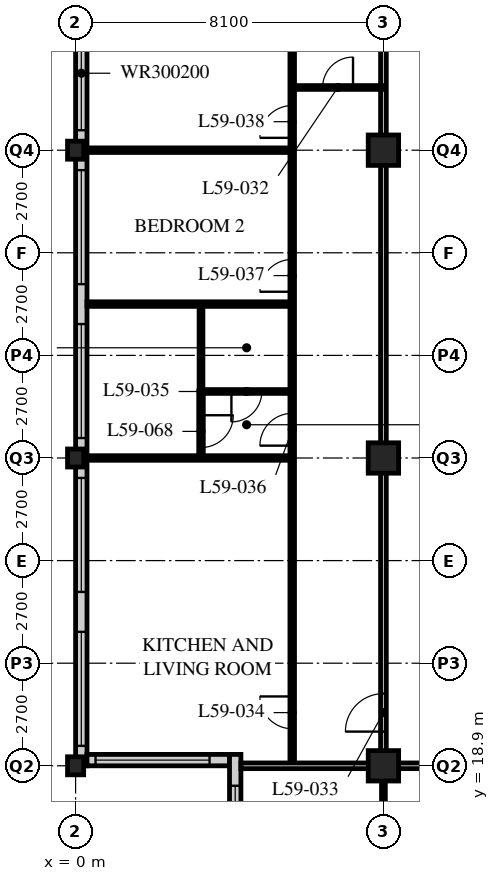
"""IFC4 building model, lengths in metres.
Left out: names, types, materials, properties, quantities, classifications, styles, units other than length and angle.
Written with IfcOpenShell. Run it as: python <this file> out.ifc"""

import sys

from ifc_helpers import new_model, si_unit, direction, frame, frame_2d, origin, origin_2d, place, context, subcontext, project, spatial, rectangle, hollow_rectangle, i_section, extrude, element, fill, save


model = new_model("IFC4")
c1 = context("Model", 3, precision=1e-05, world=origin(), true_north=direction((0.0, 1.0)))
c2 = subcontext(c1, "Body", "Model", "MODEL_VIEW")
j1 = project(units=[si_unit("LENGTHUNIT", "METRE"), si_unit("PLANEANGLEUNIT", "RADIAN")], contexts=[c1])
p1 = place(None, origin())
s1 = spatial("IfcSite", under=j1, at=p1, CompositionType="ELEMENT")
p2 = place(p1, origin())
s2 = spatial("IfcBuilding", under=s1, at=p2, CompositionType="ELEMENT")
p3 = place(p2, frame((0.0, 0.0, 228.0)))
s3 = spatial("IfcBuildingStorey", under=s2, at=p3, CompositionType="ELEMENT", Elevation=228.0)
for number, where, z_axis, x_axis in (
    (1, (0.0, 18.9, 0.0), (0.0, 0.0, 1.0), (1.0, 0.0, 0.0)),
    (2, (0.0, 27.0, 0.0), (0.0, 0.0, 1.0), (1.0, 0.0, 0.0)),
    (3, (0.0, 35.1, 0.0), (0.0, 0.0, 1.0), (1.0, 0.0, 0.0)),
):
    element("IfcColumn", number, at=place(p3, frame(where, z_axis=z_axis, x_axis=x_axis)), inside=s3, PredefinedType="COLUMN", context=c2, shape_type="SweptSolid", body=[
        extrude(i_section(OverallWidth=0.424, OverallDepth=0.475, WebThickness=0.048, FlangeThickness=0.077, FilletRadius=0.015, at=origin_2d()), origin(), (0.0, 0.0, 1.0), 3.6),
    ])
for number, where, z_axis, x_axis in (
    (4, (8.1, 18.9, 0.0), (0.0, 0.0, 1.0), (1.0, 0.0, 0.0)),
    (5, (8.1, 27.0, 0.0), (0.0, 0.0, 1.0), (1.0, 0.0, 0.0)),
    (6, (8.1, 35.1, 0.0), (0.0, 0.0, 1.0), (1.0, 0.0, 0.0)),
):
    element("IfcColumn", number, at=place(p3, frame(where, z_axis=z_axis, x_axis=x_axis)), inside=s3, PredefinedType="COLUMN", context=c2, shape_type="SweptSolid", body=[
        extrude(hollow_rectangle(XDim=0.8, YDim=0.8, WallThickness=0.08, at=origin_2d()), origin(), (0.0, 0.0, 1.0), 3.6),
    ])
p4 = place(p3, frame((0.15, 51.0, 0.0), z_axis=(0.0, 0.0, 1.0), x_axis=(0.0, -1.0, 0.0)))
e7 = element("IfcWall", 7, at=p4, inside=s3, PredefinedType="SOLIDWALL", context=c2, shape_type="SweptSolid", body=[
    extrude(rectangle(XDim=32.1, YDim=0.3, at=frame_2d((16.05, 0.0))), origin(), (0.0, 0.0, 1.0), 3.39),
])
p5 = place(p4, frame((0.225, 0.0, 0.6)))
e8 = element("IfcOpeningElement", 8, at=p5, cuts=e7, PredefinedType="OPENING", context=c2, shape_type="SweptSolid", body=[
    extrude(rectangle(XDim=3.0, YDim=2.0, at=frame_2d((1.5, 1.0))), frame((0.0, 0.16, 0.0), z_axis=(0.0, -1.0, 0.0), x_axis=(1.0, 0.0, 0.0)), (0.0, 0.0, 1.0), 0.32),
])
p6 = place(p4, frame((4.275, 0.0, 0.6)))
e9 = element("IfcOpeningElement", 9, at=p6, cuts=e7, PredefinedType="OPENING", context=c2, shape_type="SweptSolid", body=[
    extrude(rectangle(XDim=3.0, YDim=2.0, at=frame_2d((1.5, 1.0))), frame((0.0, 0.16, 0.0), z_axis=(0.0, -1.0, 0.0), x_axis=(1.0, 0.0, 0.0)), (0.0, 0.0, 1.0), 0.32),
])
p7 = place(p4, frame((8.325, 0.0, 0.6)))
e10 = element("IfcOpeningElement", 10, at=p7, cuts=e7, PredefinedType="OPENING", context=c2, shape_type="SweptSolid", body=[
    extrude(rectangle(XDim=3.0, YDim=2.0, at=frame_2d((1.5, 1.0))), frame((0.0, 0.16, 0.0), z_axis=(0.0, -1.0, 0.0), x_axis=(1.0, 0.0, 0.0)), (0.0, 0.0, 1.0), 0.32),
])
p8 = place(p4, frame((12.375, 0.0, 0.6)))
e11 = element("IfcOpeningElement", 11, at=p8, cuts=e7, PredefinedType="OPENING", context=c2, shape_type="SweptSolid", body=[
    extrude(rectangle(XDim=3.0, YDim=2.0, at=frame_2d((1.5, 1.0))), frame((0.0, 0.16, 0.0), z_axis=(0.0, -1.0, 0.0), x_axis=(1.0, 0.0, 0.0)), (0.0, 0.0, 1.0), 0.32),
])
p9 = place(p4, frame((16.425, 0.0, 0.6)))
e12 = element("IfcOpeningElement", 12, at=p9, cuts=e7, PredefinedType="OPENING", context=c2, shape_type="SweptSolid", body=[
    extrude(rectangle(XDim=3.0, YDim=2.0, at=frame_2d((1.5, 1.0))), frame((0.0, 0.16, 0.0), z_axis=(0.0, -1.0, 0.0), x_axis=(1.0, 0.0, 0.0)), (0.0, 0.0, 1.0), 0.32),
])
p10 = place(p4, frame((20.475, 0.0, 0.6)))
e13 = element("IfcOpeningElement", 13, at=p10, cuts=e7, PredefinedType="OPENING", context=c2, shape_type="SweptSolid", body=[
    extrude(rectangle(XDim=3.0, YDim=2.0, at=frame_2d((1.5, 1.0))), frame((0.0, 0.16, 0.0), z_axis=(0.0, -1.0, 0.0), x_axis=(1.0, 0.0, 0.0)), (0.0, 0.0, 1.0), 0.32),
])
p11 = place(p4, frame((24.525, 0.0, 0.6)))
e14 = element("IfcOpeningElement", 14, at=p11, cuts=e7, PredefinedType="OPENING", context=c2, shape_type="SweptSolid", body=[
    extrude(rectangle(XDim=3.0, YDim=2.0, at=frame_2d((1.5, 1.0))), frame((0.0, 0.16, 0.0), z_axis=(0.0, -1.0, 0.0), x_axis=(1.0, 0.0, 0.0)), (0.0, 0.0, 1.0), 0.32),
])
p12 = place(p4, frame((28.575, 0.0, 0.6)))
e15 = element("IfcOpeningElement", 15, at=p12, cuts=e7, PredefinedType="OPENING", context=c2, shape_type="SweptSolid", body=[
    extrude(rectangle(XDim=3.0, YDim=2.0, at=frame_2d((1.5, 1.0))), frame((0.0, 0.16, 0.0), z_axis=(0.0, -1.0, 0.0), x_axis=(1.0, 0.0, 0.0)), (0.0, 0.0, 1.0), 0.32),
])
p13 = place(p3, frame((0.3, 19.05, 0.0), z_axis=(0.0, 0.0, 1.0), x_axis=(1.0, 0.0, 0.0)))
e16 = element("IfcWall", 16, at=p13, inside=s3, PredefinedType="SOLIDWALL", context=c2, shape_type="SweptSolid", body=[
    extrude(rectangle(XDim=3.75, YDim=0.3, at=frame_2d((1.875, 0.0))), origin(), (0.0, 0.0, 1.0), 3.39),
])
p14 = place(p13, frame((0.225, 0.0, 0.6)))
e17 = element("IfcOpeningElement", 17, at=p14, cuts=e16, PredefinedType="OPENING", context=c2, shape_type="SweptSolid", body=[
    extrude(rectangle(XDim=3.0, YDim=2.0, at=frame_2d((1.5, 1.0))), frame((0.0, 0.16, 0.0), z_axis=(0.0, -1.0, 0.0), x_axis=(1.0, 0.0, 0.0)), (0.0, 0.0, 1.0), 0.32),
])
p15 = place(p3, frame((4.2, 19.2, 0.0), z_axis=(0.0, 0.0, 1.0), x_axis=(0.0, -1.0, 0.0)))
e18 = element("IfcWall", 18, at=p15, inside=s3, PredefinedType="SOLIDWALL", context=c2, shape_type="SweptSolid", body=[
    extrude(rectangle(XDim=4.35, YDim=0.3, at=frame_2d((2.175, 0.0))), origin(), (0.0, 0.0, 1.0), 3.39),
])
p16 = place(p15, frame((0.825, 0.0, 0.6)))
e19 = element("IfcOpeningElement", 19, at=p16, cuts=e18, PredefinedType="OPENING", context=c2, shape_type="SweptSolid", body=[
    extrude(rectangle(XDim=3.0, YDim=2.0, at=frame_2d((1.5, 1.0))), frame((0.0, 0.16, 0.0), z_axis=(0.0, -1.0, 0.0), x_axis=(1.0, 0.0, 0.0)), (0.0, 0.0, 1.0), 0.32),
])
p17 = place(p3, frame((8.1, 18.9, 0.0), z_axis=(0.0, 0.0, 1.0), x_axis=(1.0, 0.0, 0.0)))
e20 = element("IfcWall", 20, at=p17, inside=s3, PredefinedType="PARTITIONING", context=c2, shape_type="SweptSolid", body=[
    extrude(rectangle(XDim=36.45, YDim=0.15, at=frame_2d((18.225, 0.0))), origin(), (0.0, 0.0, 1.0), 2.628),
])
p18 = place(p17, frame((4.45, 0.0, 0.0)))
e21 = element("IfcOpeningElement", 21, at=p18, cuts=e20, PredefinedType="OPENING", context=c2, shape_type="SweptSolid", body=[
    extrude(rectangle(XDim=1.0, YDim=2.1, at=frame_2d((0.5, 1.05))), frame((0.0, 0.085, 0.0), z_axis=(0.0, -1.0, 0.0), x_axis=(1.0, 0.0, 0.0)), (0.0, 0.0, 1.0), 0.17),
])
p19 = place(p17, frame((17.1, 0.0, 0.0)))
e22 = element("IfcOpeningElement", 22, at=p19, cuts=e20, PredefinedType="OPENING", context=c2, shape_type="SweptSolid", body=[
    extrude(rectangle(XDim=1.0, YDim=2.1, at=frame_2d((0.5, 1.05))), frame((0.0, 0.085, 0.0), z_axis=(0.0, -1.0, 0.0), x_axis=(1.0, 0.0, 0.0)), (0.0, 0.0, 1.0), 0.17),
])
p20 = place(p17, frame((29.05, 0.0, 0.0)))
e23 = element("IfcOpeningElement", 23, at=p20, cuts=e20, PredefinedType="OPENING", context=c2, shape_type="SweptSolid", body=[
    extrude(rectangle(XDim=1.0, YDim=2.1, at=frame_2d((0.5, 1.05))), frame((0.0, 0.085, 0.0), z_axis=(0.0, -1.0, 0.0), x_axis=(1.0, 0.0, 0.0)), (0.0, 0.0, 1.0), 0.17),
])
p21 = place(p17, frame((2.625, 0.0, 0.0)))
e24 = element("IfcOpeningElement", 24, at=p21, cuts=e20, PredefinedType="OPENING", context=c2, shape_type="SweptSolid", body=[
    extrude(rectangle(XDim=1.0, YDim=2.1, at=frame_2d((0.5, 1.05))), frame((0.0, 0.085, 0.0), z_axis=(0.0, -1.0, 0.0), x_axis=(1.0, 0.0, 0.0)), (0.0, 0.0, 1.0), 0.17),
])
p22 = place(p17, frame((33.925, 0.0, 0.0)))
e25 = element("IfcOpeningElement", 25, at=p22, cuts=e20, PredefinedType="OPENING", context=c2, shape_type="SweptSolid", body=[
    extrude(rectangle(XDim=1.0, YDim=2.1, at=frame_2d((0.5, 1.05))), frame((0.0, 0.085, 0.0), z_axis=(0.0, -1.0, 0.0), x_axis=(1.0, 0.0, 0.0)), (0.0, 0.0, 1.0), 0.17),
])
p23 = place(p3, frame((8.1, 18.9, 0.0), z_axis=(0.0, 0.0, 1.0), x_axis=(0.0, 1.0, 0.0)))
e26 = element("IfcWall", 26, at=p23, inside=s3, PredefinedType="PARTITIONING", context=c2, shape_type="SweptSolid", body=[
    extrude(rectangle(XDim=24.3, YDim=0.15, at=frame_2d((12.15, 0.0))), origin(), (0.0, 0.0, 1.0), 2.628),
])
p24 = place(p23, frame((0.9, 0.0, 0.0)))
e27 = element("IfcOpeningElement", 27, at=p24, cuts=e26, PredefinedType="OPENING", context=c2, shape_type="SweptSolid", body=[
    extrude(rectangle(XDim=1.0, YDim=2.1, at=frame_2d((0.5, 1.05))), frame((0.0, 0.085, 0.0), z_axis=(0.0, -1.0, 0.0), x_axis=(1.0, 0.0, 0.0)), (0.0, 0.0, 1.0), 0.17),
])
p25 = place(p23, frame((20.95, 0.0, 0.0)))
e28 = element("IfcOpeningElement", 28, at=p25, cuts=e26, PredefinedType="OPENING", context=c2, shape_type="SweptSolid", body=[
    extrude(rectangle(XDim=1.0, YDim=2.1, at=frame_2d((0.5, 1.05))), frame((0.0, 0.085, 0.0), z_axis=(0.0, -1.0, 0.0), x_axis=(1.0, 0.0, 0.0)), (0.0, 0.0, 1.0), 0.17),
])
p26 = place(p3, frame((5.7, 18.9, 0.0), z_axis=(0.0, 0.0, 1.0), x_axis=(0.0, 1.0, 0.0)))
e29 = element("IfcWall", 29, at=p26, inside=s3, PredefinedType="PARTITIONING", context=c2, shape_type="SweptSolid", body=[
    extrude(rectangle(XDim=20.25, YDim=0.12, at=frame_2d((10.125, 0.0))), origin(), (0.0, 0.0, 1.0), 3.39),
])
p27 = place(p26, frame((0.975, 0.0, 0.0)))
e30 = element("IfcOpeningElement", 30, at=p27, cuts=e29, PredefinedType="OPENING", context=c2, shape_type="SweptSolid", body=[
    extrude(rectangle(XDim=0.85, YDim=2.1, at=frame_2d((0.425, 1.05))), frame((0.0, 0.07, 0.0), z_axis=(0.0, -1.0, 0.0), x_axis=(1.0, 0.0, 0.0)), (0.0, 0.0, 1.0), 0.14),
])
p28 = place(p26, frame((8.425, 0.0, 0.0)))
e31 = element("IfcOpeningElement", 31, at=p28, cuts=e29, PredefinedType="OPENING", context=c2, shape_type="SweptSolid", body=[
    extrude(rectangle(XDim=0.85, YDim=2.1, at=frame_2d((0.425, 1.05))), frame((0.0, 0.07, 0.0), z_axis=(0.0, -1.0, 0.0), x_axis=(1.0, 0.0, 0.0)), (0.0, 0.0, 1.0), 0.14),
])
p29 = place(p26, frame((12.475, 0.0, 0.0)))
e32 = element("IfcOpeningElement", 32, at=p29, cuts=e29, PredefinedType="OPENING", context=c2, shape_type="SweptSolid", body=[
    extrude(rectangle(XDim=0.85, YDim=2.1, at=frame_2d((0.425, 1.05))), frame((0.0, 0.07, 0.0), z_axis=(0.0, -1.0, 0.0), x_axis=(1.0, 0.0, 0.0)), (0.0, 0.0, 1.0), 0.14),
])
p30 = place(p26, frame((16.525, 0.0, 0.0)))
e33 = element("IfcOpeningElement", 33, at=p30, cuts=e29, PredefinedType="OPENING", context=c2, shape_type="SweptSolid", body=[
    extrude(rectangle(XDim=0.85, YDim=2.1, at=frame_2d((0.425, 1.05))), frame((0.0, 0.07, 0.0), z_axis=(0.0, -1.0, 0.0), x_axis=(1.0, 0.0, 0.0)), (0.0, 0.0, 1.0), 0.14),
])
p31 = place(p3, frame((8.1, 36.75, 0.0), z_axis=(0.0, 0.0, 1.0), x_axis=(-1.0, 0.0, 0.0)))
e34 = element("IfcWall", 34, at=p31, inside=s3, PredefinedType="PARTITIONING", context=c2, shape_type="SweptSolid", body=[
    extrude(rectangle(XDim=2.4, YDim=0.1, at=frame_2d((1.2, 0.0))), origin(), (0.0, 0.0, 1.0), 3.39),
])
p32 = place(p31, frame((0.8, 0.0, 0.0)))
e35 = element("IfcOpeningElement", 35, at=p32, cuts=e34, PredefinedType="OPENING", context=c2, shape_type="SweptSolid", body=[
    extrude(rectangle(XDim=0.8, YDim=2.1, at=frame_2d((0.4, 1.05))), frame((0.0, 0.06, 0.0), z_axis=(0.0, -1.0, 0.0), x_axis=(1.0, 0.0, 0.0)), (0.0, 0.0, 1.0), 0.12),
])
p33 = place(p3, frame((5.7, 28.75, 0.0), z_axis=(0.0, 0.0, 1.0), x_axis=(-1.0, 0.0, 0.0)))
e36 = element("IfcWall", 36, at=p33, inside=s3, PredefinedType="PARTITIONING", context=c2, shape_type="SweptSolid", body=[
    extrude(rectangle(XDim=2.4, YDim=0.1, at=frame_2d((1.2, 0.0))), origin(), (0.0, 0.0, 1.0), 3.39),
])
p34 = place(p33, frame((0.8, 0.0, 0.0)))
e37 = element("IfcOpeningElement", 37, at=p34, cuts=e36, PredefinedType="OPENING", context=c2, shape_type="SweptSolid", body=[
    extrude(rectangle(XDim=0.8, YDim=2.1, at=frame_2d((0.4, 1.05))), frame((0.0, 0.06, 0.0), z_axis=(0.0, -1.0, 0.0), x_axis=(1.0, 0.0, 0.0)), (0.0, 0.0, 1.0), 0.12),
])
p35 = place(p3, frame((3.3, 28.75, 0.0), z_axis=(0.0, 0.0, 1.0), x_axis=(0.0, 1.0, 0.0)))
e38 = element("IfcWall", 38, at=p35, inside=s3, PredefinedType="PARTITIONING", context=c2, shape_type="SweptSolid", body=[
    extrude(rectangle(XDim=2.3, YDim=0.1, at=frame_2d((1.15, 0.0))), origin(), (0.0, 0.0, 1.0), 3.39),
])
p36 = place(p3, frame((5.7, 27.0, 0.0), z_axis=(0.0, 0.0, 1.0), x_axis=(-1.0, 0.0, 0.0)))
e39 = element("IfcWall", 39, at=p36, inside=s3, PredefinedType="PARTITIONING", context=c2, shape_type="SweptSolid", body=[
    extrude(rectangle(XDim=5.4, YDim=0.12, at=frame_2d((2.7, 0.0))), origin(), (0.0, 0.0, 1.0), 2.628),
])
p37 = place(p3, frame((5.7, 31.05, 0.0), z_axis=(0.0, 0.0, 1.0), x_axis=(-1.0, 0.0, 0.0)))
e40 = element("IfcWall", 40, at=p37, inside=s3, PredefinedType="PARTITIONING", context=c2, shape_type="SweptSolid", body=[
    extrude(rectangle(XDim=5.4, YDim=0.12, at=frame_2d((2.7, 0.0))), origin(), (0.0, 0.0, 1.0), 3.39),
])
p38 = place(p3, frame((5.7, 35.1, 0.0), z_axis=(0.0, 0.0, 1.0), x_axis=(-1.0, 0.0, 0.0)))
e41 = element("IfcWall", 41, at=p38, inside=s3, PredefinedType="PARTITIONING", context=c2, shape_type="SweptSolid", body=[
    extrude(rectangle(XDim=5.4, YDim=0.12, at=frame_2d((2.7, 0.0))), origin(), (0.0, 0.0, 1.0), 2.628),
])
p39 = place(p3, frame((8.1, 18.9, 0.0), z_axis=(0.0, 0.0, 1.0), x_axis=(0.0, -1.0, 0.0)))
e42 = element("IfcWall", 42, at=p39, inside=s3, PredefinedType="PARTITIONING", context=c2, shape_type="SweptSolid", body=[
    extrude(rectangle(XDim=2.4, YDim=0.1, at=frame_2d((1.2, 0.0))), origin(), (0.0, 0.0, 1.0), 2.628),
])
p40 = place(p3, frame((4.35, 18.9, 0.0), z_axis=(0.0, 0.0, 1.0), x_axis=(1.0, 0.0, 0.0)))
e43 = element("IfcWall", 43, at=p40, inside=s3, PredefinedType="PARTITIONING", context=c2, shape_type="SweptSolid", body=[
    extrude(rectangle(XDim=3.75, YDim=0.15, at=frame_2d((1.875, 0.0))), origin(), (0.0, 0.0, 1.0), 2.628),
])
p41 = place(p3, frame((3.3, 27.0, 0.0), z_axis=(0.0, 0.0, 1.0), x_axis=(0.0, 1.0, 0.0)))
e44 = element("IfcWall", 44, at=p41, inside=s3, PredefinedType="PARTITIONING", context=c2, shape_type="SweptSolid", body=[
    extrude(rectangle(XDim=1.76, YDim=0.12, at=frame_2d((0.88, 0.0))), origin(), (0.0, 0.0, 1.0), 3.39),
])
p42 = place(p41, frame((0.275, 0.0, 0.0)))
e45 = element("IfcOpeningElement", 45, at=p42, cuts=e44, PredefinedType="OPENING", context=c2, shape_type="SweptSolid", body=[
    extrude(rectangle(XDim=0.85, YDim=2.1, at=frame_2d((0.425, 1.05))), frame((0.0, 0.07, 0.0), z_axis=(0.0, -1.0, 0.0), x_axis=(1.0, 0.0, 0.0)), (0.0, 0.0, 1.0), 0.14),
])
p43 = place(p8, origin())
e46 = element("IfcWindow", 46, at=p43, inside=s3, PartitioningType="SINGLE_PANEL", PredefinedType="WINDOW", context=c2, shape_type="SweptSolid", body=[
    extrude(rectangle(XDim=3.0, YDim=2.0, at=frame_2d((1.5, 1.0))), frame((0.0, 0.03, 0.0), z_axis=(0.0, -1.0, 0.0), x_axis=(1.0, 0.0, 0.0)), (0.0, 0.0, 1.0), 0.06),
])
fill(e11, e46)
p44 = place(p9, origin())
e47 = element("IfcWindow", 47, at=p44, inside=s3, PartitioningType="SINGLE_PANEL", PredefinedType="WINDOW", context=c2, shape_type="SweptSolid", body=[
    extrude(rectangle(XDim=3.0, YDim=2.0, at=frame_2d((1.5, 1.0))), frame((0.0, 0.03, 0.0), z_axis=(0.0, -1.0, 0.0), x_axis=(1.0, 0.0, 0.0)), (0.0, 0.0, 1.0), 0.06),
])
fill(e12, e47)
p45 = place(p10, origin())
e48 = element("IfcWindow", 48, at=p45, inside=s3, PartitioningType="SINGLE_PANEL", PredefinedType="WINDOW", context=c2, shape_type="SweptSolid", body=[
    extrude(rectangle(XDim=3.0, YDim=2.0, at=frame_2d((1.5, 1.0))), frame((0.0, 0.03, 0.0), z_axis=(0.0, -1.0, 0.0), x_axis=(1.0, 0.0, 0.0)), (0.0, 0.0, 1.0), 0.06),
])
fill(e13, e48)
p46 = place(p11, origin())
e49 = element("IfcWindow", 49, at=p46, inside=s3, PartitioningType="SINGLE_PANEL", PredefinedType="WINDOW", context=c2, shape_type="SweptSolid", body=[
    extrude(rectangle(XDim=3.0, YDim=2.0, at=frame_2d((1.5, 1.0))), frame((0.0, 0.03, 0.0), z_axis=(0.0, -1.0, 0.0), x_axis=(1.0, 0.0, 0.0)), (0.0, 0.0, 1.0), 0.06),
])
fill(e14, e49)
p47 = place(p12, origin())
e50 = element("IfcWindow", 50, at=p47, inside=s3, PartitioningType="SINGLE_PANEL", PredefinedType="WINDOW", context=c2, shape_type="SweptSolid", body=[
    extrude(rectangle(XDim=3.0, YDim=2.0, at=frame_2d((1.5, 1.0))), frame((0.0, 0.03, 0.0), z_axis=(0.0, -1.0, 0.0), x_axis=(1.0, 0.0, 0.0)), (0.0, 0.0, 1.0), 0.06),
])
fill(e15, e50)
p48 = place(p14, origin())
e51 = element("IfcWindow", 51, at=p48, inside=s3, PartitioningType="SINGLE_PANEL", PredefinedType="WINDOW", context=c2, shape_type="SweptSolid", body=[
    extrude(rectangle(XDim=3.0, YDim=2.0, at=frame_2d((1.5, 1.0))), frame((0.0, 0.03, 0.0), z_axis=(0.0, -1.0, 0.0), x_axis=(1.0, 0.0, 0.0)), (0.0, 0.0, 1.0), 0.06),
])
fill(e17, e51)
p49 = place(p16, origin())
e52 = element("IfcWindow", 52, at=p49, inside=s3, PartitioningType="SINGLE_PANEL", PredefinedType="WINDOW", context=c2, shape_type="SweptSolid", body=[
    extrude(rectangle(XDim=3.0, YDim=2.0, at=frame_2d((1.5, 1.0))), frame((0.0, 0.03, 0.0), z_axis=(0.0, -1.0, 0.0), x_axis=(1.0, 0.0, 0.0)), (0.0, 0.0, 1.0), 0.06),
])
fill(e19, e52)
p50 = place(p32, origin())
e53 = element("IfcDoor", 53, at=p50, inside=s3, OperationType="SINGLE_SWING_RIGHT", PredefinedType="DOOR", context=c2, shape_type="SweptSolid", body=[
    extrude(rectangle(XDim=0.8, YDim=2.1, at=frame_2d((0.4, 1.05))), frame((0.0, 0.025, 0.0), z_axis=(0.0, -1.0, 0.0), x_axis=(1.0, 0.0, 0.0)), (0.0, 0.0, 1.0), 0.05),
])
fill(e35, e53)
p51 = place(p24, origin())
e54 = element("IfcDoor", 54, at=p51, inside=s3, OperationType="SINGLE_SWING_LEFT", PredefinedType="DOOR", context=c2, shape_type="SweptSolid", body=[
    extrude(rectangle(XDim=1.0, YDim=2.1, at=frame_2d((0.5, 1.05))), frame((0.0, 0.025, 0.0), z_axis=(0.0, -1.0, 0.0), x_axis=(1.0, 0.0, 0.0)), (0.0, 0.0, 1.0), 0.05),
])
fill(e27, e54)
p52 = place(p27, origin())
e55 = element("IfcDoor", 55, at=p52, inside=s3, OperationType="SINGLE_SWING_RIGHT", PredefinedType="DOOR", context=c2, shape_type="SweptSolid", body=[
    extrude(rectangle(XDim=0.85, YDim=2.1, at=frame_2d((0.425, 1.05))), frame((0.0, 0.025, 0.0), z_axis=(0.0, -1.0, 0.0), x_axis=(1.0, 0.0, 0.0)), (0.0, 0.0, 1.0), 0.05),
])
fill(e30, e55)
p53 = place(p34, origin())
e56 = element("IfcDoor", 56, at=p53, inside=s3, OperationType="SINGLE_SWING_RIGHT", PredefinedType="DOOR", context=c2, shape_type="SweptSolid", body=[
    extrude(rectangle(XDim=0.8, YDim=2.1, at=frame_2d((0.4, 1.05))), frame((0.0, 0.025, 0.0), z_axis=(0.0, -1.0, 0.0), x_axis=(1.0, 0.0, 0.0)), (0.0, 0.0, 1.0), 0.05),
])
fill(e37, e56)
p54 = place(p28, origin())
e57 = element("IfcDoor", 57, at=p54, inside=s3, OperationType="SINGLE_SWING_LEFT", PredefinedType="DOOR", context=c2, shape_type="SweptSolid", body=[
    extrude(rectangle(XDim=0.85, YDim=2.1, at=frame_2d((0.425, 1.05))), frame((0.0, 0.025, 0.0), z_axis=(0.0, -1.0, 0.0), x_axis=(1.0, 0.0, 0.0)), (0.0, 0.0, 1.0), 0.05),
])
fill(e31, e57)
p55 = place(p29, origin())
e58 = element("IfcDoor", 58, at=p55, inside=s3, OperationType="SINGLE_SWING_LEFT", PredefinedType="DOOR", context=c2, shape_type="SweptSolid", body=[
    extrude(rectangle(XDim=0.85, YDim=2.1, at=frame_2d((0.425, 1.05))), frame((0.0, 0.025, 0.0), z_axis=(0.0, -1.0, 0.0), x_axis=(1.0, 0.0, 0.0)), (0.0, 0.0, 1.0), 0.05),
])
fill(e32, e58)
p56 = place(p30, origin())
e59 = element("IfcDoor", 59, at=p56, inside=s3, OperationType="SINGLE_SWING_LEFT", PredefinedType="DOOR", context=c2, shape_type="SweptSolid", body=[
    extrude(rectangle(XDim=0.85, YDim=2.1, at=frame_2d((0.425, 1.05))), frame((0.0, 0.025, 0.0), z_axis=(0.0, -1.0, 0.0), x_axis=(1.0, 0.0, 0.0)), (0.0, 0.0, 1.0), 0.05),
])
fill(e33, e59)
p57 = place(p42, origin())
e60 = element("IfcDoor", 60, at=p57, inside=s3, OperationType="SINGLE_SWING_LEFT", PredefinedType="DOOR", context=c2, shape_type="SweptSolid", body=[
    extrude(rectangle(XDim=0.85, YDim=2.1, at=frame_2d((0.425, 1.05))), frame((0.0, 0.025, 0.0), z_axis=(0.0, -1.0, 0.0), x_axis=(1.0, 0.0, 0.0)), (0.0, 0.0, 1.0), 0.05),
])
fill(e45, e60)
save(model, sys.argv[1])
